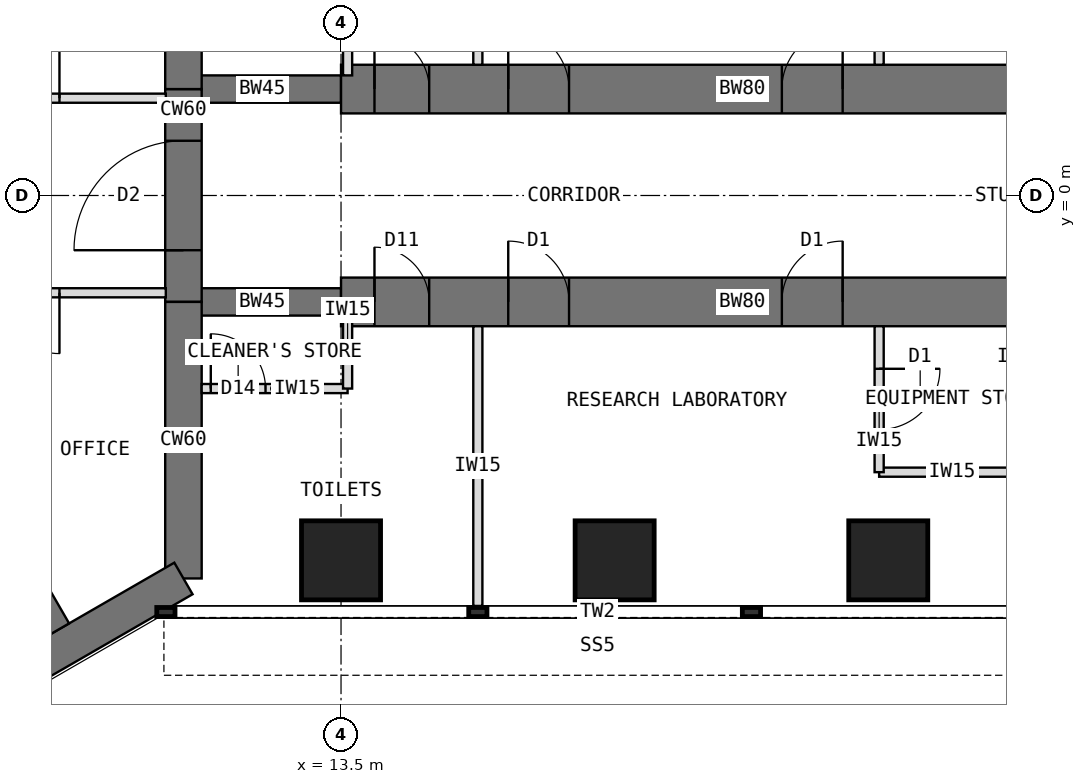
"""IFC4 building model, lengths in metres.
Left out: names, types, materials, properties, quantities, classifications, styles, units other than length and angle.
Written with IfcOpenShell. Run it as: python <this file> out.ifc"""

import sys

from ifc_helpers import new_model, si_unit, direction, frame, frame_2d, origin, origin_2d, place, context, subcontext, project, spatial, rectangle, extrude, element, fill, save


model = new_model("IFC4")
c1 = context("Model", 3, precision=1e-05, world=origin(), true_north=direction((0.0, 1.0)))
c2 = subcontext(c1, "Body", "Model", "MODEL_VIEW")
j1 = project(units=[si_unit("LENGTHUNIT", "METRE"), si_unit("PLANEANGLEUNIT", "RADIAN")], contexts=[c1])
p1 = place(None, origin())
s1 = spatial("IfcSite", under=j1, at=p1, CompositionType="ELEMENT")
p2 = place(p1, origin())
s2 = spatial("IfcBuilding", under=s1, at=p2, CompositionType="ELEMENT")
p3 = place(p2, frame((0.0, 0.0, 121.5)))
s3 = spatial("IfcBuildingStorey", under=s2, at=p3, CompositionType="ELEMENT", Elevation=121.5)
p4 = place(p3, frame((10.908, -6.298, 0.0), z_axis=(0.0, 0.0, 1.0), x_axis=(0.0, 1.0, 0.0)))
e1 = element("IfcWall", 1, at=p4, inside=s3, PredefinedType="SHEAR", context=c2, shape_type="SweptSolid", body=[
    extrude(rectangle(XDim=4.548, YDim=0.6, at=frame_2d((2.274, 0.0))), origin(), (0.0, 0.0, 1.0), 4.0),
])
p5 = place(p3, frame((10.908, -1.75, 0.0), z_axis=(0.0, 0.0, 1.0), x_axis=(0.0, 1.0, 0.0)))
e2 = element("IfcWall", 2, at=p5, inside=s3, PredefinedType="SHEAR", context=c2, shape_type="SweptSolid", body=[
    extrude(rectangle(XDim=3.5, YDim=0.6, at=frame_2d((1.75, 0.0))), origin(), (0.0, 0.0, 1.0), 4.0),
])
p6 = place(p5, frame((0.85, 0.0, 0.0)))
e3 = element("IfcOpeningElement", 3, at=p6, cuts=e2, PredefinedType="OPENING", context=c2, shape_type="SweptSolid", body=[
    extrude(rectangle(XDim=1.8, YDim=2.1, at=frame_2d((0.9, 1.05))), frame((0.0, 0.31, 0.0), z_axis=(0.0, -1.0, 0.0), x_axis=(1.0, 0.0, 0.0)), (0.0, 0.0, 1.0), 0.62),
])
p7 = place(p3, frame((10.908, 1.75, 0.0), z_axis=(0.0, 0.0, 1.0), x_axis=(0.0, 1.0, 0.0)))
e4 = element("IfcWall", 4, at=p7, inside=s3, PredefinedType="SHEAR", context=c2, shape_type="SweptSolid", body=[
    extrude(rectangle(XDim=4.548, YDim=0.6, at=frame_2d((2.274, 0.0))), origin(), (0.0, 0.0, 1.0), 4.0),
])
p8 = place(p3, frame((0.0, -12.596, 0.0), z_axis=(0.0, 0.0, 1.0), x_axis=(0.866021940709, 0.500005998175, 0.0)))
e5 = element("IfcWall", 5, at=p8, inside=s3, PredefinedType="SHEAR", context=c2, shape_type="SweptSolid", body=[
    extrude(rectangle(XDim=12.596, YDim=0.6, at=frame_2d((6.298, 0.0))), origin(), (0.0, 0.0, 1.0), 4.0),
])
p9 = place(p3, frame((10.908, 1.75, 0.0), z_axis=(0.0, 0.0, 1.0), x_axis=(1.0, 0.0, 0.0)))
e6 = element("IfcWall", 6, at=p9, inside=s3, PredefinedType="SHEAR", context=c2, shape_type="SweptSolid", body=[
    extrude(rectangle(XDim=2.592, YDim=0.45, at=frame_2d((1.296, 0.0))), origin(), (0.0, 0.0, 1.0), 4.0),
])
p10 = place(p3, frame((13.5, 1.75, 0.0), z_axis=(0.0, 0.0, 1.0), x_axis=(1.0, 0.0, 0.0)))
e7 = element("IfcWall", 7, at=p10, inside=s3, PredefinedType="SHEAR", context=c2, shape_type="SweptSolid", body=[
    extrude(rectangle(XDim=13.2, YDim=0.8, at=frame_2d((6.6, 0.0))), origin(), (0.0, 0.0, 1.0), 4.0),
])
p11 = place(p10, frame((0.55, 0.0, 0.0)))
e8 = element("IfcOpeningElement", 8, at=p11, cuts=e7, PredefinedType="OPENING", context=c2, shape_type="SweptSolid", body=[
    extrude(rectangle(XDim=0.9, YDim=2.1, at=frame_2d((0.45, 1.05))), frame((0.0, 0.41, 0.0), z_axis=(0.0, -1.0, 0.0), x_axis=(1.0, 0.0, 0.0)), (0.0, 0.0, 1.0), 0.82),
])
p12 = place(p10, frame((2.75, 0.0, 0.0)))
e9 = element("IfcOpeningElement", 9, at=p12, cuts=e7, PredefinedType="OPENING", context=c2, shape_type="SweptSolid", body=[
    extrude(rectangle(XDim=1.0, YDim=2.1, at=frame_2d((0.5, 1.05))), frame((0.0, 0.41, 0.0), z_axis=(0.0, -1.0, 0.0), x_axis=(1.0, 0.0, 0.0)), (0.0, 0.0, 1.0), 0.82),
])
p13 = place(p10, frame((7.25, 0.0, 0.0)))
e10 = element("IfcOpeningElement", 10, at=p13, cuts=e7, PredefinedType="OPENING", context=c2, shape_type="SweptSolid", body=[
    extrude(rectangle(XDim=1.0, YDim=2.1, at=frame_2d((0.5, 1.05))), frame((0.0, 0.41, 0.0), z_axis=(0.0, -1.0, 0.0), x_axis=(1.0, 0.0, 0.0)), (0.0, 0.0, 1.0), 0.82),
])
p14 = place(p3, frame((10.908, -1.75, 0.0), z_axis=(0.0, 0.0, 1.0), x_axis=(1.0, 0.0, 0.0)))
e11 = element("IfcWall", 11, at=p14, inside=s3, PredefinedType="SHEAR", context=c2, shape_type="SweptSolid", body=[
    extrude(rectangle(XDim=2.592, YDim=0.45, at=frame_2d((1.296, 0.0))), origin(), (0.0, 0.0, 1.0), 4.0),
])
p15 = place(p3, frame((13.5, -1.75, 0.0), z_axis=(0.0, 0.0, 1.0), x_axis=(1.0, 0.0, 0.0)))
e12 = element("IfcWall", 12, at=p15, inside=s3, PredefinedType="SHEAR", context=c2, shape_type="SweptSolid", body=[
    extrude(rectangle(XDim=13.2, YDim=0.8, at=frame_2d((6.6, 0.0))), origin(), (0.0, 0.0, 1.0), 4.0),
])
p16 = place(p15, frame((0.55, 0.0, 0.0)))
e13 = element("IfcOpeningElement", 13, at=p16, cuts=e12, PredefinedType="OPENING", context=c2, shape_type="SweptSolid", body=[
    extrude(rectangle(XDim=0.9, YDim=2.1, at=frame_2d((0.45, 1.05))), frame((0.0, 0.41, 0.0), z_axis=(0.0, -1.0, 0.0), x_axis=(1.0, 0.0, 0.0)), (0.0, 0.0, 1.0), 0.82),
])
p17 = place(p15, frame((2.75, 0.0, 0.0)))
e14 = element("IfcOpeningElement", 14, at=p17, cuts=e12, PredefinedType="OPENING", context=c2, shape_type="SweptSolid", body=[
    extrude(rectangle(XDim=1.0, YDim=2.1, at=frame_2d((0.5, 1.05))), frame((0.0, 0.41, 0.0), z_axis=(0.0, -1.0, 0.0), x_axis=(1.0, 0.0, 0.0)), (0.0, 0.0, 1.0), 0.82),
])
p18 = place(p15, frame((7.25, 0.0, 0.0)))
e15 = element("IfcOpeningElement", 15, at=p18, cuts=e12, PredefinedType="OPENING", context=c2, shape_type="SweptSolid", body=[
    extrude(rectangle(XDim=1.0, YDim=2.1, at=frame_2d((0.5, 1.05))), frame((0.0, 0.41, 0.0), z_axis=(0.0, -1.0, 0.0), x_axis=(1.0, 0.0, 0.0)), (0.0, 0.0, 1.0), 0.82),
])
for number, where, z_axis, x_axis in (
    (16, (13.5, -6.0, 0.0), (0.0, 0.0, 1.0), (1.0, 0.0, 0.0)),
    (17, (18.0, -6.0, 0.0), (0.0, 0.0, 1.0), (1.0, 0.0, 0.0)),
    (18, (22.5, -6.0, 0.0), (0.0, 0.0, 1.0), (1.0, 0.0, 0.0)),
):
    element("IfcColumn", number, at=place(p3, frame(where, z_axis=z_axis, x_axis=x_axis)), inside=s3, PredefinedType="COLUMN", context=c2, shape_type="SweptSolid", body=[
        extrude(rectangle(XDim=1.3, YDim=1.3, at=origin_2d()), origin(), (0.0, 0.0, 1.0), 4.0),
    ])
for number, where, z_axis, x_axis in (
    (19, (5.901, 2.02, 0.0), (0.0, 0.0, 1.0), (0.5, 0.866, 0.0)),
    (20, (5.901, -2.02, 0.0), (0.0, 0.0, 1.0), (0.5, -0.866, 0.0)),
):
    element("IfcWall", number, at=place(p3, frame(where, z_axis=z_axis, x_axis=x_axis)), inside=s3, PredefinedType="SHEAR", context=c2, shape_type="SweptSolid", body=[
        extrude(rectangle(XDim=5.908, YDim=0.4, at=frame_2d((2.954, 0.0))), origin(), (0.0, 0.0, 1.0), 4.0),
    ])
p19 = place(p3, frame((15.75, 2.15, 0.0), z_axis=(0.0, 0.0, 1.0), x_axis=(0.0, 1.0, 0.0)))
e21 = element("IfcWall", 21, at=p19, inside=s3, PredefinedType="PARTITIONING", context=c2, shape_type="SweptSolid", body=[
    extrude(rectangle(XDim=4.6, YDim=0.15, at=frame_2d((2.3, 0.0))), origin(), (0.0, 0.0, 1.0), 3.8),
])
p20 = place(p3, frame((22.35, 2.15, 0.0), z_axis=(0.0, 0.0, 1.0), x_axis=(0.0, 1.0, 0.0)))
e22 = element("IfcWall", 22, at=p20, inside=s3, PredefinedType="PARTITIONING", context=c2, shape_type="SweptSolid", body=[
    extrude(rectangle(XDim=2.4, YDim=0.15, at=frame_2d((1.2, 0.0))), origin(), (0.0, 0.0, 1.0), 3.8),
])
p21 = place(p20, frame((0.7, 0.0, 0.0)))
e23 = element("IfcOpeningElement", 23, at=p21, cuts=e22, PredefinedType="OPENING", context=c2, shape_type="SweptSolid", body=[
    extrude(rectangle(XDim=1.0, YDim=2.1, at=frame_2d((0.5, 1.05))), frame((0.0, 0.085, 0.0), z_axis=(0.0, -1.0, 0.0), x_axis=(1.0, 0.0, 0.0)), (0.0, 0.0, 1.0), 0.17),
])
p22 = place(p3, frame((13.608, 1.975, 0.0), z_axis=(0.0, 0.0, 1.0), x_axis=(0.0, 1.0, 0.0)))
e24 = element("IfcWall", 24, at=p22, inside=s3, PredefinedType="PARTITIONING", context=c2, shape_type="SweptSolid", body=[
    extrude(rectangle(XDim=3.2, YDim=0.15, at=frame_2d((1.6, 0.0))), origin(), (0.0, 0.0, 1.0), 3.8),
])
p23 = place(p3, frame((15.75, -2.15, 0.0), z_axis=(0.0, 0.0, 1.0), x_axis=(0.0, -1.0, 0.0)))
e25 = element("IfcWall", 25, at=p23, inside=s3, PredefinedType="PARTITIONING", context=c2, shape_type="SweptSolid", body=[
    extrude(rectangle(XDim=4.6, YDim=0.15, at=frame_2d((2.3, 0.0))), origin(), (0.0, 0.0, 1.0), 3.8),
])
p24 = place(p3, frame((22.35, -4.55, 0.0), z_axis=(0.0, 0.0, 1.0), x_axis=(1.0, 0.0, 0.0)))
e26 = element("IfcWall", 26, at=p24, inside=s3, PredefinedType="PARTITIONING", context=c2, shape_type="SweptSolid", body=[
    extrude(rectangle(XDim=2.4, YDim=0.15, at=frame_2d((1.2, 0.0))), origin(), (0.0, 0.0, 1.0), 3.8),
])
p25 = place(p3, frame((22.35, -2.15, 0.0), z_axis=(0.0, 0.0, 1.0), x_axis=(0.0, -1.0, 0.0)))
e27 = element("IfcWall", 27, at=p25, inside=s3, PredefinedType="PARTITIONING", context=c2, shape_type="SweptSolid", body=[
    extrude(rectangle(XDim=2.4, YDim=0.15, at=frame_2d((1.2, 0.0))), origin(), (0.0, 0.0, 1.0), 3.8),
])
p26 = place(p25, frame((0.7, 0.0, 0.0)))
e28 = element("IfcOpeningElement", 28, at=p26, cuts=e27, PredefinedType="OPENING", context=c2, shape_type="SweptSolid", body=[
    extrude(rectangle(XDim=1.0, YDim=2.1, at=frame_2d((0.5, 1.05))), frame((0.0, 0.085, 0.0), z_axis=(0.0, -1.0, 0.0), x_axis=(1.0, 0.0, 0.0)), (0.0, 0.0, 1.0), 0.17),
])
p27 = place(p3, frame((11.208, -3.175, 0.0), z_axis=(0.0, 0.0, 1.0), x_axis=(1.0, 0.0, 0.0)))
e29 = element("IfcWall", 29, at=p27, inside=s3, PredefinedType="PARTITIONING", context=c2, shape_type="SweptSolid", body=[
    extrude(rectangle(XDim=2.4, YDim=0.15, at=frame_2d((1.2, 0.0))), origin(), (0.0, 0.0, 1.0), 3.8),
])
p28 = place(p27, frame((0.15, 0.0, 0.0)))
e30 = element("IfcOpeningElement", 30, at=p28, cuts=e29, PredefinedType="OPENING", context=c2, shape_type="SweptSolid", body=[
    extrude(rectangle(XDim=0.9, YDim=2.1, at=frame_2d((0.45, 1.05))), frame((0.0, 0.085, 0.0), z_axis=(0.0, -1.0, 0.0), x_axis=(1.0, 0.0, 0.0)), (0.0, 0.0, 1.0), 0.17),
])
p29 = place(p3, frame((13.608, -1.975, 0.0), z_axis=(0.0, 0.0, 1.0), x_axis=(0.0, -1.0, 0.0)))
e31 = element("IfcWall", 31, at=p29, inside=s3, PredefinedType="PARTITIONING", context=c2, shape_type="SweptSolid", body=[
    extrude(rectangle(XDim=1.2, YDim=0.15, at=frame_2d((0.6, 0.0))), origin(), (0.0, 0.0, 1.0), 3.8),
])
p30 = place(p3, frame((6.1, 1.6, 0.0), z_axis=(0.0, 0.0, 1.0), x_axis=(1.0, 0.0, 0.0)))
e32 = element("IfcWall", 32, at=p30, inside=s3, PredefinedType="PARTITIONING", context=c2, shape_type="SweptSolid", body=[
    extrude(rectangle(XDim=4.519, YDim=0.15, at=frame_2d((2.259, 0.0))), origin(), (0.0, 0.0, 1.0), 3.8),
])
p31 = place(p30, frame((1.769, 0.0, 0.0)))
e33 = element("IfcOpeningElement", 33, at=p31, cuts=e32, PredefinedType="OPENING", context=c2, shape_type="SweptSolid", body=[
    extrude(rectangle(XDim=1.0, YDim=2.1, at=frame_2d((0.5, 1.05))), frame((0.0, 0.085, 0.0), z_axis=(0.0, -1.0, 0.0), x_axis=(1.0, 0.0, 0.0)), (0.0, 0.0, 1.0), 0.17),
])
p32 = place(p3, frame((10.618, -1.6, 0.0), z_axis=(0.0, 0.0, 1.0), x_axis=(-1.0, 0.0, 0.0)))
e34 = element("IfcWall", 34, at=p32, inside=s3, PredefinedType="PARTITIONING", context=c2, shape_type="SweptSolid", body=[
    extrude(rectangle(XDim=4.519, YDim=0.15, at=frame_2d((2.259, 0.0))), origin(), (0.0, 0.0, 1.0), 3.8),
])
p33 = place(p32, frame((1.749, 0.0, 0.0)))
e35 = element("IfcOpeningElement", 35, at=p33, cuts=e34, PredefinedType="OPENING", context=c2, shape_type="SweptSolid", body=[
    extrude(rectangle(XDim=1.0, YDim=2.1, at=frame_2d((0.5, 1.05))), frame((0.0, 0.085, 0.0), z_axis=(0.0, -1.0, 0.0), x_axis=(1.0, 0.0, 0.0)), (0.0, 0.0, 1.0), 0.17),
])
p34 = place(p6, origin())
e36 = element("IfcDoor", 36, at=p34, inside=s3, OperationType="DOUBLE_DOOR_DOUBLE_SWING", PredefinedType="DOOR", context=c2, shape_type="SweptSolid", body=[
    extrude(rectangle(XDim=1.72, YDim=2.06, at=frame_2d((0.9, 1.03))), frame((0.0, 0.025, 0.0), z_axis=(0.0, -1.0, 0.0), x_axis=(1.0, 0.0, 0.0)), (0.0, 0.0, 1.0), 0.05),
    extrude(rectangle(XDim=0.04, YDim=2.1, at=frame_2d((0.02, 1.05))), frame((0.0, 0.3, 0.0), z_axis=(0.0, -1.0, 0.0), x_axis=(1.0, 0.0, 0.0)), (0.0, 0.0, 1.0), 0.6),
    extrude(rectangle(XDim=0.04, YDim=2.1, at=frame_2d((1.78, 1.05))), frame((0.0, 0.3, 0.0), z_axis=(0.0, -1.0, 0.0), x_axis=(1.0, 0.0, 0.0)), (0.0, 0.0, 1.0), 0.6),
    extrude(rectangle(XDim=1.72, YDim=0.04, at=frame_2d((0.9, 2.08))), frame((0.0, 0.3, 0.0), z_axis=(0.0, -1.0, 0.0), x_axis=(1.0, 0.0, 0.0)), (0.0, 0.0, 1.0), 0.6),
])
fill(e3, e36)
p35 = place(p26, origin())
e37 = element("IfcDoor", 37, at=p35, inside=s3, OperationType="SINGLE_SWING_LEFT", PredefinedType="DOOR", context=c2, shape_type="SweptSolid", body=[
    extrude(rectangle(XDim=1.0, YDim=2.1, at=frame_2d((0.5, 1.05))), frame((0.0, 0.025, 0.0), z_axis=(0.0, -1.0, 0.0), x_axis=(1.0, 0.0, 0.0)), (0.0, 0.0, 1.0), 0.05),
])
fill(e28, e37)
p36 = place(p28, origin())
e38 = element("IfcDoor", 38, at=p36, inside=s3, OperationType="SINGLE_SWING_LEFT", PredefinedType="DOOR", context=c2, shape_type="SweptSolid", body=[
    extrude(rectangle(XDim=0.9, YDim=2.1, at=frame_2d((0.45, 1.05))), frame((0.0, 0.025, 0.0), z_axis=(0.0, -1.0, 0.0), x_axis=(1.0, 0.0, 0.0)), (0.0, 0.0, 1.0), 0.05),
])
fill(e30, e38)
p37 = place(p33, origin())
e39 = element("IfcDoor", 39, at=p37, inside=s3, OperationType="SINGLE_SWING_LEFT", PredefinedType="DOOR", context=c2, shape_type="SweptSolid", body=[
    extrude(rectangle(XDim=1.0, YDim=2.1, at=frame_2d((0.5, 1.05))), frame((0.0, 0.025, 0.0), z_axis=(0.0, -1.0, 0.0), x_axis=(1.0, 0.0, 0.0)), (0.0, 0.0, 1.0), 0.05),
])
fill(e35, e39)
p38 = place(p31, origin())
e40 = element("IfcDoor", 40, at=p38, inside=s3, OperationType="SINGLE_SWING_RIGHT", PredefinedType="DOOR", context=c2, shape_type="SweptSolid", body=[
    extrude(rectangle(XDim=1.0, YDim=2.1, at=frame_2d((0.5, 1.05))), frame((0.0, 0.025, 0.0), z_axis=(0.0, -1.0, 0.0), x_axis=(1.0, 0.0, 0.0)), (0.0, 0.0, 1.0), 0.05),
])
fill(e33, e40)
p39 = place(p11, origin())
e41 = element("IfcDoor", 41, at=p39, inside=s3, OperationType="SINGLE_SWING_LEFT", PredefinedType="DOOR", context=c2, shape_type="SweptSolid", body=[
    extrude(rectangle(XDim=0.82, YDim=2.06, at=frame_2d((0.45, 1.03))), frame((0.0, 0.025, 0.0), z_axis=(0.0, -1.0, 0.0), x_axis=(1.0, 0.0, 0.0)), (0.0, 0.0, 1.0), 0.05),
    extrude(rectangle(XDim=0.04, YDim=2.1, at=frame_2d((0.02, 1.05))), frame((0.0, 0.4, 0.0), z_axis=(0.0, -1.0, 0.0), x_axis=(1.0, 0.0, 0.0)), (0.0, 0.0, 1.0), 0.8),
    extrude(rectangle(XDim=0.04, YDim=2.1, at=frame_2d((0.88, 1.05))), frame((0.0, 0.4, 0.0), z_axis=(0.0, -1.0, 0.0), x_axis=(1.0, 0.0, 0.0)), (0.0, 0.0, 1.0), 0.8),
    extrude(rectangle(XDim=0.82, YDim=0.04, at=frame_2d((0.45, 2.08))), frame((0.0, 0.4, 0.0), z_axis=(0.0, -1.0, 0.0), x_axis=(1.0, 0.0, 0.0)), (0.0, 0.0, 1.0), 0.8),
])
fill(e8, e41)
p40 = place(p12, origin())
e42 = element("IfcDoor", 42, at=p40, inside=s3, OperationType="SINGLE_SWING_LEFT", PredefinedType="DOOR", context=c2, shape_type="SweptSolid", body=[
    extrude(rectangle(XDim=0.92, YDim=2.06, at=frame_2d((0.5, 1.03))), frame((0.0, 0.025, 0.0), z_axis=(0.0, -1.0, 0.0), x_axis=(1.0, 0.0, 0.0)), (0.0, 0.0, 1.0), 0.05),
    extrude(rectangle(XDim=0.04, YDim=2.1, at=frame_2d((0.02, 1.05))), frame((0.0, 0.4, 0.0), z_axis=(0.0, -1.0, 0.0), x_axis=(1.0, 0.0, 0.0)), (0.0, 0.0, 1.0), 0.8),
    extrude(rectangle(XDim=0.04, YDim=2.1, at=frame_2d((0.98, 1.05))), frame((0.0, 0.4, 0.0), z_axis=(0.0, -1.0, 0.0), x_axis=(1.0, 0.0, 0.0)), (0.0, 0.0, 1.0), 0.8),
    extrude(rectangle(XDim=0.92, YDim=0.04, at=frame_2d((0.5, 2.08))), frame((0.0, 0.4, 0.0), z_axis=(0.0, -1.0, 0.0), x_axis=(1.0, 0.0, 0.0)), (0.0, 0.0, 1.0), 0.8),
])
fill(e9, e42)
p41 = place(p13, origin())
e43 = element("IfcDoor", 43, at=p41, inside=s3, OperationType="SINGLE_SWING_RIGHT", PredefinedType="DOOR", context=c2, shape_type="SweptSolid", body=[
    extrude(rectangle(XDim=0.92, YDim=2.06, at=frame_2d((0.5, 1.03))), frame((0.0, 0.025, 0.0), z_axis=(0.0, -1.0, 0.0), x_axis=(1.0, 0.0, 0.0)), (0.0, 0.0, 1.0), 0.05),
    extrude(rectangle(XDim=0.04, YDim=2.1, at=frame_2d((0.02, 1.05))), frame((0.0, 0.4, 0.0), z_axis=(0.0, -1.0, 0.0), x_axis=(1.0, 0.0, 0.0)), (0.0, 0.0, 1.0), 0.8),
    extrude(rectangle(XDim=0.04, YDim=2.1, at=frame_2d((0.98, 1.05))), frame((0.0, 0.4, 0.0), z_axis=(0.0, -1.0, 0.0), x_axis=(1.0, 0.0, 0.0)), (0.0, 0.0, 1.0), 0.8),
    extrude(rectangle(XDim=0.92, YDim=0.04, at=frame_2d((0.5, 2.08))), frame((0.0, 0.4, 0.0), z_axis=(0.0, -1.0, 0.0), x_axis=(1.0, 0.0, 0.0)), (0.0, 0.0, 1.0), 0.8),
])
fill(e10, e43)
p42 = place(p16, origin())
e44 = element("IfcDoor", 44, at=p42, inside=s3, OperationType="SINGLE_SWING_LEFT", PredefinedType="DOOR", context=c2, shape_type="SweptSolid", body=[
    extrude(rectangle(XDim=0.82, YDim=2.06, at=frame_2d((0.45, 1.03))), frame((0.0, 0.025, 0.0), z_axis=(0.0, -1.0, 0.0), x_axis=(1.0, 0.0, 0.0)), (0.0, 0.0, 1.0), 0.05),
    extrude(rectangle(XDim=0.04, YDim=2.1, at=frame_2d((0.02, 1.05))), frame((0.0, 0.4, 0.0), z_axis=(0.0, -1.0, 0.0), x_axis=(1.0, 0.0, 0.0)), (0.0, 0.0, 1.0), 0.8),
    extrude(rectangle(XDim=0.04, YDim=2.1, at=frame_2d((0.88, 1.05))), frame((0.0, 0.4, 0.0), z_axis=(0.0, -1.0, 0.0), x_axis=(1.0, 0.0, 0.0)), (0.0, 0.0, 1.0), 0.8),
    extrude(rectangle(XDim=0.82, YDim=0.04, at=frame_2d((0.45, 2.08))), frame((0.0, 0.4, 0.0), z_axis=(0.0, -1.0, 0.0), x_axis=(1.0, 0.0, 0.0)), (0.0, 0.0, 1.0), 0.8),
])
fill(e13, e44)
p43 = place(p17, origin())
e45 = element("IfcDoor", 45, at=p43, inside=s3, OperationType="SINGLE_SWING_LEFT", PredefinedType="DOOR", context=c2, shape_type="SweptSolid", body=[
    extrude(rectangle(XDim=0.92, YDim=2.06, at=frame_2d((0.5, 1.03))), frame((0.0, 0.025, 0.0), z_axis=(0.0, -1.0, 0.0), x_axis=(1.0, 0.0, 0.0)), (0.0, 0.0, 1.0), 0.05),
    extrude(rectangle(XDim=0.04, YDim=2.1, at=frame_2d((0.02, 1.05))), frame((0.0, 0.4, 0.0), z_axis=(0.0, -1.0, 0.0), x_axis=(1.0, 0.0, 0.0)), (0.0, 0.0, 1.0), 0.8),
    extrude(rectangle(XDim=0.04, YDim=2.1, at=frame_2d((0.98, 1.05))), frame((0.0, 0.4, 0.0), z_axis=(0.0, -1.0, 0.0), x_axis=(1.0, 0.0, 0.0)), (0.0, 0.0, 1.0), 0.8),
    extrude(rectangle(XDim=0.92, YDim=0.04, at=frame_2d((0.5, 2.08))), frame((0.0, 0.4, 0.0), z_axis=(0.0, -1.0, 0.0), x_axis=(1.0, 0.0, 0.0)), (0.0, 0.0, 1.0), 0.8),
])
fill(e14, e45)
p44 = place(p18, origin())
e46 = element("IfcDoor", 46, at=p44, inside=s3, OperationType="SINGLE_SWING_RIGHT", PredefinedType="DOOR", context=c2, shape_type="SweptSolid", body=[
    extrude(rectangle(XDim=0.92, YDim=2.06, at=frame_2d((0.5, 1.03))), frame((0.0, 0.025, 0.0), z_axis=(0.0, -1.0, 0.0), x_axis=(1.0, 0.0, 0.0)), (0.0, 0.0, 1.0), 0.05),
    extrude(rectangle(XDim=0.04, YDim=2.1, at=frame_2d((0.02, 1.05))), frame((0.0, 0.4, 0.0), z_axis=(0.0, -1.0, 0.0), x_axis=(1.0, 0.0, 0.0)), (0.0, 0.0, 1.0), 0.8),
    extrude(rectangle(XDim=0.04, YDim=2.1, at=frame_2d((0.98, 1.05))), frame((0.0, 0.4, 0.0), z_axis=(0.0, -1.0, 0.0), x_axis=(1.0, 0.0, 0.0)), (0.0, 0.0, 1.0), 0.8),
    extrude(rectangle(XDim=0.92, YDim=0.04, at=frame_2d((0.5, 2.08))), frame((0.0, 0.4, 0.0), z_axis=(0.0, -1.0, 0.0), x_axis=(1.0, 0.0, 0.0)), (0.0, 0.0, 1.0), 0.8),
])
fill(e15, e46)
save(model, sys.argv[1])
